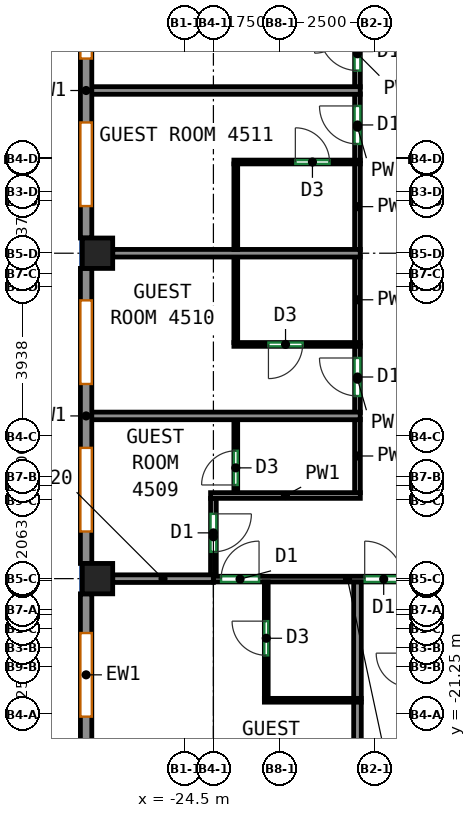
"""IFC4 building model, lengths in metres.
Left out: names, types, materials, properties, quantities, classifications, styles, units other than length and angle.
Written with IfcOpenShell. Run it as: python <this file> out.ifc"""

import sys

from ifc_helpers import new_model, si_unit, direction, frame, frame_2d, origin, origin_2d, place, context, subcontext, project, spatial, rectangle, extrude, source, transform, mapped, element, fill, save


model = new_model("IFC4")
c1 = context("Model", 3, precision=1e-05, world=origin(), true_north=direction((0.0, 1.0)))
c2 = subcontext(c1, "Body", "Model", "MODEL_VIEW")
j1 = project(units=[si_unit("LENGTHUNIT", "METRE"), si_unit("PLANEANGLEUNIT", "RADIAN")], contexts=[c1])
p1 = place(None, origin())
s1 = spatial("IfcSite", under=j1, at=p1, CompositionType="ELEMENT")
p2 = place(p1, origin())
s2 = spatial("IfcBuilding", under=s1, at=p2, CompositionType="ELEMENT")
p3 = place(p2, frame((0.0, 0.0, 188.9)))
s3 = spatial("IfcBuildingStorey", under=s2, at=p3, CompositionType="ELEMENT", Elevation=188.9)
m1 = source(origin(), c2, "Body", "SweptSolid", [
    extrude(rectangle(XDim=0.8, YDim=0.8, at=origin_2d()), origin(), (0.0, 0.0, 1.0), 3.12),
])
for number, where, z_axis, x_axis in (
    (1, (-26.8, -17.688, 0.0), (0.0, 0.0, 1.0), (1.0, 0.0, 0.0)),
    (2, (-26.8, -9.125, 0.0), (0.0, 0.0, 1.0), (1.0, 0.0, 0.0)),
):
    element("IfcColumn", number, at=place(p3, frame(where, z_axis=z_axis, x_axis=x_axis)), inside=s3, PredefinedType="COLUMN", context=c2, shape_type="MappedRepresentation", body=[
        mapped(m1, transform((0.0, 0.0, 0.0))),
    ])
m2 = source(origin(), c2, "Body", "SweptSolid", [
    extrude(rectangle(XDim=7.763, YDim=0.3, at=frame_2d((3.881, 0.0))), origin(), (0.0, 0.0, 1.0), 3.12),
])
p4 = place(p3, frame((-27.1, -0.962, 0.0), z_axis=(0.0, 0.0, 1.0), x_axis=(0.0, -1.0, 0.0)))
e3 = element("IfcWall", 3, at=p4, inside=s3, PredefinedType="SOLIDWALL", context=c2, shape_type="MappedRepresentation", body=[
    mapped(m2, transform((0.0, 0.0, 0.0))),
])
p5 = place(p4, frame((0.841, 0.0, 0.85)))
e4 = element("IfcOpeningElement", 4, at=p5, cuts=e3, PredefinedType="OPENING", context=c2, shape_type="SweptSolid", body=[
    extrude(rectangle(XDim=2.2, YDim=1.95, at=frame_2d((1.1, 0.975))), frame((0.0, 0.16, 0.0), z_axis=(0.0, -1.0, 0.0), x_axis=(1.0, 0.0, 0.0)), (0.0, 0.0, 1.0), 0.32),
])
p6 = place(p4, frame((4.722, 0.0, 0.85)))
e5 = element("IfcOpeningElement", 5, at=p6, cuts=e3, PredefinedType="OPENING", context=c2, shape_type="SweptSolid", body=[
    extrude(rectangle(XDim=2.2, YDim=1.95, at=frame_2d((1.1, 0.975))), frame((0.0, 0.16, 0.0), z_axis=(0.0, -1.0, 0.0), x_axis=(1.0, 0.0, 0.0)), (0.0, 0.0, 1.0), 0.32),
])
p7 = place(p3, frame((-27.1, -9.525, 0.0), z_axis=(0.0, 0.0, 1.0), x_axis=(0.0, -1.0, 0.0)))
e6 = element("IfcWall", 6, at=p7, inside=s3, PredefinedType="SOLIDWALL", context=c2, shape_type="MappedRepresentation", body=[
    mapped(m2, transform((0.0, 0.0, 0.0))),
])
p8 = place(p7, frame((0.841, 0.0, 0.85)))
e7 = element("IfcOpeningElement", 7, at=p8, cuts=e6, PredefinedType="OPENING", context=c2, shape_type="SweptSolid", body=[
    extrude(rectangle(XDim=2.2, YDim=1.95, at=frame_2d((1.1, 0.975))), frame((0.0, 0.16, 0.0), z_axis=(0.0, -1.0, 0.0), x_axis=(1.0, 0.0, 0.0)), (0.0, 0.0, 1.0), 0.32),
])
p9 = place(p7, frame((4.722, 0.0, 0.85)))
e8 = element("IfcOpeningElement", 8, at=p9, cuts=e6, PredefinedType="OPENING", context=c2, shape_type="SweptSolid", body=[
    extrude(rectangle(XDim=2.2, YDim=1.95, at=frame_2d((1.1, 0.975))), frame((0.0, 0.16, 0.0), z_axis=(0.0, -1.0, 0.0), x_axis=(1.0, 0.0, 0.0)), (0.0, 0.0, 1.0), 0.32),
])
m3 = source(origin(), c2, "Body", "SweptSolid", [
    extrude(rectangle(XDim=4.263, YDim=0.3, at=frame_2d((2.131, 0.0))), origin(), (0.0, 0.0, 1.0), 3.12),
])
p10 = place(p3, frame((-27.1, -18.087, 0.0), z_axis=(0.0, 0.0, 1.0), x_axis=(0.0, -1.0, 0.0)))
e9 = element("IfcWall", 9, at=p10, inside=s3, PredefinedType="SOLIDWALL", context=c2, shape_type="MappedRepresentation", body=[
    mapped(m3, transform((0.0, 0.0, 0.0))),
])
p11 = place(p10, frame((1.031, 0.0, 0.85)))
e10 = element("IfcOpeningElement", 10, at=p11, cuts=e9, PredefinedType="OPENING", context=c2, shape_type="SweptSolid", body=[
    extrude(rectangle(XDim=2.2, YDim=1.95, at=frame_2d((1.1, 0.975))), frame((0.0, 0.16, 0.0), z_axis=(0.0, -1.0, 0.0), x_axis=(1.0, 0.0, 0.0)), (0.0, 0.0, 1.0), 0.32),
])
p12 = place(p3, frame((-23.75, -17.7, 0.0), z_axis=(0.0, 0.0, 1.0), x_axis=(1.0, 0.0, 0.0)))
e11 = element("IfcWall", 11, at=p12, inside=s3, PredefinedType="PARTITIONING", context=c2, shape_type="SweptSolid", body=[
    extrude(rectangle(XDim=7.058, YDim=0.15, at=frame_2d((3.529, 0.0))), origin(), (0.0, 0.0, 1.0), 2.52),
])
p13 = place(p12, frame((0.201, 0.0, 0.0)))
e12 = element("IfcOpeningElement", 12, at=p13, cuts=e11, PredefinedType="OPENING", context=c2, shape_type="SweptSolid", body=[
    extrude(rectangle(XDim=1.0, YDim=2.1, at=frame_2d((0.5, 1.05))), frame((0.0, 0.085, 0.0), z_axis=(0.0, -1.0, 0.0), x_axis=(1.0, 0.0, 0.0)), (0.0, 0.0, 1.0), 0.17),
])
p14 = place(p12, frame((3.981, 0.0, 0.0)))
e13 = element("IfcOpeningElement", 13, at=p14, cuts=e11, PredefinedType="OPENING", context=c2, shape_type="SweptSolid", body=[
    extrude(rectangle(XDim=1.0, YDim=2.1, at=frame_2d((0.5, 1.05))), frame((0.0, 0.085, 0.0), z_axis=(0.0, -1.0, 0.0), x_axis=(1.0, 0.0, 0.0)), (0.0, 0.0, 1.0), 0.17),
])
p15 = place(p3, frame((-23.75, -15.575, 0.0), z_axis=(0.0, 0.0, 1.0), x_axis=(0.0, -1.0, 0.0)))
e14 = element("IfcWall", 14, at=p15, inside=s3, PredefinedType="PARTITIONING", context=c2, shape_type="SweptSolid", body=[
    extrude(rectangle(XDim=2.023, YDim=0.15, at=frame_2d((1.011, 0.0))), origin(), (0.0, 0.0, 1.0), 2.52),
])
p16 = place(p15, frame((0.408, 0.0, 0.0)))
e15 = element("IfcOpeningElement", 15, at=p16, cuts=e14, PredefinedType="OPENING", context=c2, shape_type="SweptSolid", body=[
    extrude(rectangle(XDim=1.0, YDim=2.1, at=frame_2d((0.5, 1.05))), frame((0.0, 0.085, 0.0), z_axis=(0.0, -1.0, 0.0), x_axis=(1.0, 0.0, 0.0)), (0.0, 0.0, 1.0), 0.17),
])
p17 = place(p3, frame((-23.825, -15.5, 0.0), z_axis=(0.0, 0.0, 1.0), x_axis=(1.0, 0.0, 0.0)))
e16 = element("IfcWall", 16, at=p17, inside=s3, PredefinedType="PARTITIONING", context=c2, shape_type="SweptSolid", body=[
    extrude(rectangle(XDim=3.941, YDim=0.15, at=frame_2d((1.97, 0.0))), origin(), (0.0, 0.0, 1.0), 3.12),
])
p18 = place(p3, frame((-19.959, -15.425, 0.0), z_axis=(0.0, 0.0, 1.0), x_axis=(0.0, 1.0, 0.0)))
e17 = element("IfcWall", 17, at=p18, inside=s3, PredefinedType="PARTITIONING", context=c2, shape_type="SweptSolid", body=[
    extrude(rectangle(XDim=1.929, YDim=0.15, at=frame_2d((0.964, 0.0))), origin(), (0.0, 0.0, 1.0), 3.12),
])
p19 = place(p3, frame((-19.959, -13.316, 0.0), z_axis=(0.0, 0.0, 1.0), x_axis=(0.0, 1.0, 0.0)))
e18 = element("IfcWall", 18, at=p19, inside=s3, PredefinedType="PARTITIONING", context=c2, shape_type="SweptSolid", body=[
    extrude(rectangle(XDim=1.751, YDim=0.15, at=frame_2d((0.875, 0.0))), origin(), (0.0, 0.0, 1.0), 3.12),
])
p20 = place(p19, frame((0.434, 0.0, 0.0)))
e19 = element("IfcOpeningElement", 19, at=p20, cuts=e18, PredefinedType="OPENING", context=c2, shape_type="SweptSolid", body=[
    extrude(rectangle(XDim=1.0, YDim=2.1, at=frame_2d((0.5, 1.05))), frame((0.0, 0.085, 0.0), z_axis=(0.0, -1.0, 0.0), x_axis=(1.0, 0.0, 0.0)), (0.0, 0.0, 1.0), 0.17),
])
p21 = place(p3, frame((-19.959, -11.485, 0.0), z_axis=(0.0, 0.0, 1.0), x_axis=(0.0, 1.0, 0.0)))
e20 = element("IfcWall", 20, at=p21, inside=s3, PredefinedType="PARTITIONING", context=c2, shape_type="SweptSolid", body=[
    extrude(rectangle(XDim=2.27, YDim=0.15, at=frame_2d((1.135, 0.0))), origin(), (0.0, 0.0, 1.0), 3.12),
])
p22 = place(p3, frame((-19.959, -6.685, 0.0), z_axis=(0.0, 0.0, 1.0), x_axis=(0.0, 1.0, 0.0)))
e21 = element("IfcWall", 21, at=p22, inside=s3, PredefinedType="PARTITIONING", context=c2, shape_type="SweptSolid", body=[
    extrude(rectangle(XDim=1.752, YDim=0.15, at=frame_2d((0.876, 0.0))), origin(), (0.0, 0.0, 1.0), 3.12),
])
p23 = place(p22, frame((0.435, 0.0, 0.0)))
e22 = element("IfcOpeningElement", 22, at=p23, cuts=e21, PredefinedType="OPENING", context=c2, shape_type="SweptSolid", body=[
    extrude(rectangle(XDim=1.0, YDim=2.1, at=frame_2d((0.5, 1.05))), frame((0.0, 0.085, 0.0), z_axis=(0.0, -1.0, 0.0), x_axis=(1.0, 0.0, 0.0)), (0.0, 0.0, 1.0), 0.17),
])
p24 = place(p3, frame((-19.959, -9.035, 0.0), z_axis=(0.0, 0.0, 1.0), x_axis=(0.0, 1.0, 0.0)))
e23 = element("IfcWall", 23, at=p24, inside=s3, PredefinedType="PARTITIONING", context=c2, shape_type="SweptSolid", body=[
    extrude(rectangle(XDim=2.27, YDim=0.15, at=frame_2d((1.135, 0.0))), origin(), (0.0, 0.0, 1.0), 3.12),
])
p25 = place(p3, frame((-19.959, -4.753, 0.0), z_axis=(0.0, 0.0, 1.0), x_axis=(0.0, 1.0, 0.0)))
e24 = element("IfcWall", 24, at=p25, inside=s3, PredefinedType="PARTITIONING", context=c2, shape_type="SweptSolid", body=[
    extrude(rectangle(XDim=1.751, YDim=0.15, at=frame_2d((0.875, 0.0))), origin(), (0.0, 0.0, 1.0), 3.12),
])
p26 = place(p25, frame((0.434, 0.0, 0.0)))
e25 = element("IfcOpeningElement", 25, at=p26, cuts=e24, PredefinedType="OPENING", context=c2, shape_type="SweptSolid", body=[
    extrude(rectangle(XDim=1.0, YDim=2.1, at=frame_2d((0.5, 1.05))), frame((0.0, 0.085, 0.0), z_axis=(0.0, -1.0, 0.0), x_axis=(1.0, 0.0, 0.0)), (0.0, 0.0, 1.0), 0.17),
])
p27 = place(p3, frame((-22.359, -20.838, 0.0), z_axis=(0.0, 0.0, 1.0), x_axis=(0.0, 1.0, 0.0)))
e26 = element("IfcWall", 26, at=p27, inside=s3, PredefinedType="PARTITIONING", context=c2, shape_type="SweptSolid", body=[
    extrude(rectangle(XDim=3.061, YDim=0.1, at=frame_2d((1.53, 0.0))), origin(), (0.0, 0.0, 1.0), 3.12),
])
p28 = place(p27, frame((1.132, 0.0, 0.0)))
e27 = element("IfcOpeningElement", 27, at=p28, cuts=e26, PredefinedType="OPENING", context=c2, shape_type="SweptSolid", body=[
    extrude(rectangle(XDim=0.9, YDim=2.1, at=frame_2d((0.45, 1.05))), frame((0.0, 0.06, 0.0), z_axis=(0.0, -1.0, 0.0), x_axis=(1.0, 0.0, 0.0)), (0.0, 0.0, 1.0), 0.12),
])
p29 = place(p3, frame((-22.409, -20.888, 0.0), z_axis=(0.0, 0.0, 1.0), x_axis=(1.0, 0.0, 0.0)))
e28 = element("IfcWall", 28, at=p29, inside=s3, PredefinedType="PARTITIONING", context=c2, shape_type="SweptSolid", body=[
    extrude(rectangle(XDim=2.55, YDim=0.1, at=frame_2d((1.275, 0.0))), origin(), (0.0, 0.0, 1.0), 3.12),
])
p30 = place(p3, frame((-19.959, -26.0, 0.0), z_axis=(0.0, 0.0, 1.0), x_axis=(0.0, 1.0, 0.0)))
e29 = element("IfcWall", 29, at=p30, inside=s3, PredefinedType="PARTITIONING", context=c2, shape_type="SweptSolid", body=[
    extrude(rectangle(XDim=5.062, YDim=0.2, at=frame_2d((2.531, 0.0))), origin(), (0.0, 0.0, 1.0), 3.12),
])
p31 = place(p3, frame((-26.4, -17.688, 0.0), z_axis=(0.0, 0.0, 1.0), x_axis=(1.0, 0.0, 0.0)))
e30 = element("IfcWall", 30, at=p31, inside=s3, PredefinedType="PARTITIONING", context=c2, shape_type="SweptSolid", body=[
    extrude(rectangle(XDim=2.648, YDim=0.2, at=frame_2d((1.324, 0.0))), origin(), (0.0, 0.0, 1.0), 2.52),
])
p32 = place(p3, frame((-19.959, -20.838, 0.0), z_axis=(0.0, 0.0, 1.0), x_axis=(0.0, 1.0, 0.0)))
e31 = element("IfcWall", 31, at=p32, inside=s3, PredefinedType="PARTITIONING", context=c2, shape_type="SweptSolid", body=[
    extrude(rectangle(XDim=3.061, YDim=0.2, at=frame_2d((1.53, 0.0))), origin(), (0.0, 0.0, 1.0), 3.12),
])
p33 = place(p3, frame((-23.161, -15.423, 0.0), z_axis=(0.0, 0.0, 1.0), x_axis=(0.0, 1.0, 0.0)))
e32 = element("IfcWall", 32, at=p33, inside=s3, PredefinedType="PARTITIONING", context=c2, shape_type="SweptSolid", body=[
    extrude(rectangle(XDim=1.917, YDim=0.1, at=frame_2d((0.958, 0.0))), origin(), (0.0, 0.0, 1.0), 3.12),
])
p34 = place(p33, frame((0.2, 0.0, 0.0)))
e33 = element("IfcOpeningElement", 33, at=p34, cuts=e32, PredefinedType="OPENING", context=c2, shape_type="SweptSolid", body=[
    extrude(rectangle(XDim=0.9, YDim=2.1, at=frame_2d((0.45, 1.05))), frame((0.0, 0.06, 0.0), z_axis=(0.0, -1.0, 0.0), x_axis=(1.0, 0.0, 0.0)), (0.0, 0.0, 1.0), 0.12),
])
p35 = place(p3, frame((-27.0, -13.406, 0.0), z_axis=(0.0, 0.0, 1.0), x_axis=(1.0, 0.0, 0.0)))
e34 = element("IfcWall", 34, at=p35, inside=s3, PredefinedType="PARTITIONING", context=c2, shape_type="SweptSolid", body=[
    extrude(rectangle(XDim=7.114, YDim=0.2, at=frame_2d((3.557, 0.0))), origin(), (0.0, 0.0, 1.0), 3.12),
])
p36 = place(p3, frame((-19.886, -11.525, 0.0), z_axis=(0.0, 0.0, 1.0), x_axis=(-1.0, 0.0, 0.0)))
e35 = element("IfcWall", 35, at=p36, inside=s3, PredefinedType="PARTITIONING", context=c2, shape_type="SweptSolid", body=[
    extrude(rectangle(XDim=3.325, YDim=0.1, at=frame_2d((1.663, 0.0))), origin(), (0.0, 0.0, 1.0), 3.12),
])
p37 = place(p36, frame((1.516, 0.0, 0.0)))
e36 = element("IfcOpeningElement", 36, at=p37, cuts=e35, PredefinedType="OPENING", context=c2, shape_type="SweptSolid", body=[
    extrude(rectangle(XDim=0.9, YDim=2.1, at=frame_2d((0.45, 1.05))), frame((0.0, 0.06, 0.0), z_axis=(0.0, -1.0, 0.0), x_axis=(1.0, 0.0, 0.0)), (0.0, 0.0, 1.0), 0.12),
])
p38 = place(p3, frame((-23.161, -11.475, 0.0), z_axis=(0.0, 0.0, 1.0), x_axis=(0.0, 1.0, 0.0)))
e37 = element("IfcWall", 37, at=p38, inside=s3, PredefinedType="PARTITIONING", context=c2, shape_type="SweptSolid", body=[
    extrude(rectangle(XDim=2.25, YDim=0.1, at=frame_2d((1.125, 0.0))), origin(), (0.0, 0.0, 1.0), 3.12),
])
p39 = place(p3, frame((-26.4, -9.125, 0.0), z_axis=(0.0, 0.0, 1.0), x_axis=(1.0, 0.0, 0.0)))
e38 = element("IfcWall", 38, at=p39, inside=s3, PredefinedType="PARTITIONING", context=c2, shape_type="SweptSolid", body=[
    extrude(rectangle(XDim=6.514, YDim=0.2, at=frame_2d((3.257, 0.0))), origin(), (0.0, 0.0, 1.0), 3.12),
])
p40 = place(p3, frame((-23.211, -6.725, 0.0), z_axis=(0.0, 0.0, 1.0), x_axis=(1.0, 0.0, 0.0)))
e39 = element("IfcWall", 39, at=p40, inside=s3, PredefinedType="PARTITIONING", context=c2, shape_type="SweptSolid", body=[
    extrude(rectangle(XDim=3.325, YDim=0.1, at=frame_2d((1.663, 0.0))), origin(), (0.0, 0.0, 1.0), 3.12),
])
p41 = place(p40, frame((1.617, 0.0, 0.0)))
e40 = element("IfcOpeningElement", 40, at=p41, cuts=e39, PredefinedType="OPENING", context=c2, shape_type="SweptSolid", body=[
    extrude(rectangle(XDim=0.9, YDim=2.1, at=frame_2d((0.45, 1.05))), frame((0.0, 0.06, 0.0), z_axis=(0.0, -1.0, 0.0), x_axis=(1.0, 0.0, 0.0)), (0.0, 0.0, 1.0), 0.12),
])
p42 = place(p3, frame((-23.161, -9.025, 0.0), z_axis=(0.0, 0.0, 1.0), x_axis=(0.0, 1.0, 0.0)))
e41 = element("IfcWall", 41, at=p42, inside=s3, PredefinedType="PARTITIONING", context=c2, shape_type="SweptSolid", body=[
    extrude(rectangle(XDim=2.25, YDim=0.1, at=frame_2d((1.125, 0.0))), origin(), (0.0, 0.0, 1.0), 3.12),
])
p43 = place(p3, frame((-27.0, -4.843, 0.0), z_axis=(0.0, 0.0, 1.0), x_axis=(1.0, 0.0, 0.0)))
e42 = element("IfcWall", 42, at=p43, inside=s3, PredefinedType="PARTITIONING", context=c2, shape_type="SweptSolid", body=[
    extrude(rectangle(XDim=7.114, YDim=0.2, at=frame_2d((3.557, 0.0))), origin(), (0.0, 0.0, 1.0), 3.12),
])
p44 = place(p5, origin())
e43 = element("IfcWindow", 43, at=p44, inside=s3, PartitioningType="SINGLE_PANEL", PredefinedType="WINDOW", context=c2, shape_type="SweptSolid", body=[
    extrude(rectangle(XDim=2.2, YDim=1.95, at=frame_2d((1.1, 0.975))), frame((0.0, 0.03, 0.0), z_axis=(0.0, -1.0, 0.0), x_axis=(1.0, 0.0, 0.0)), (0.0, 0.0, 1.0), 0.06),
])
fill(e4, e43)
p45 = place(p6, origin())
e44 = element("IfcWindow", 44, at=p45, inside=s3, PartitioningType="SINGLE_PANEL", PredefinedType="WINDOW", context=c2, shape_type="SweptSolid", body=[
    extrude(rectangle(XDim=2.2, YDim=1.95, at=frame_2d((1.1, 0.975))), frame((0.0, 0.03, 0.0), z_axis=(0.0, -1.0, 0.0), x_axis=(1.0, 0.0, 0.0)), (0.0, 0.0, 1.0), 0.06),
])
fill(e5, e44)
p46 = place(p8, origin())
e45 = element("IfcWindow", 45, at=p46, inside=s3, PartitioningType="SINGLE_PANEL", PredefinedType="WINDOW", context=c2, shape_type="SweptSolid", body=[
    extrude(rectangle(XDim=2.2, YDim=1.95, at=frame_2d((1.1, 0.975))), frame((0.0, 0.03, 0.0), z_axis=(0.0, -1.0, 0.0), x_axis=(1.0, 0.0, 0.0)), (0.0, 0.0, 1.0), 0.06),
])
fill(e7, e45)
p47 = place(p9, origin())
e46 = element("IfcWindow", 46, at=p47, inside=s3, PartitioningType="SINGLE_PANEL", PredefinedType="WINDOW", context=c2, shape_type="SweptSolid", body=[
    extrude(rectangle(XDim=2.2, YDim=1.95, at=frame_2d((1.1, 0.975))), frame((0.0, 0.03, 0.0), z_axis=(0.0, -1.0, 0.0), x_axis=(1.0, 0.0, 0.0)), (0.0, 0.0, 1.0), 0.06),
])
fill(e8, e46)
p48 = place(p11, origin())
e47 = element("IfcWindow", 47, at=p48, inside=s3, PartitioningType="SINGLE_PANEL", PredefinedType="WINDOW", context=c2, shape_type="SweptSolid", body=[
    extrude(rectangle(XDim=2.2, YDim=1.95, at=frame_2d((1.1, 0.975))), frame((0.0, 0.03, 0.0), z_axis=(0.0, -1.0, 0.0), x_axis=(1.0, 0.0, 0.0)), (0.0, 0.0, 1.0), 0.06),
])
fill(e10, e47)
p49 = place(p28, origin())
e48 = element("IfcDoor", 48, at=p49, inside=s3, OperationType="SINGLE_SWING_RIGHT", PredefinedType="DOOR", context=c2, shape_type="SweptSolid", body=[
    extrude(rectangle(XDim=0.9, YDim=2.1, at=frame_2d((0.45, 1.05))), frame((0.0, 0.025, 0.0), z_axis=(0.0, -1.0, 0.0), x_axis=(1.0, 0.0, 0.0)), (0.0, 0.0, 1.0), 0.05),
])
fill(e27, e48)
p50 = place(p13, origin())
e49 = element("IfcDoor", 49, at=p50, inside=s3, OperationType="SINGLE_SWING_RIGHT", PredefinedType="DOOR", context=c2, shape_type="SweptSolid", body=[
    extrude(rectangle(XDim=1.0, YDim=2.1, at=frame_2d((0.5, 1.05))), frame((0.0, 0.025, 0.0), z_axis=(0.0, -1.0, 0.0), x_axis=(1.0, 0.0, 0.0)), (0.0, 0.0, 1.0), 0.05),
])
fill(e12, e49)
p51 = place(p14, origin())
e50 = element("IfcDoor", 50, at=p51, inside=s3, OperationType="SINGLE_SWING_LEFT", PredefinedType="DOOR", context=c2, shape_type="SweptSolid", body=[
    extrude(rectangle(XDim=1.0, YDim=2.1, at=frame_2d((0.5, 1.05))), frame((0.0, 0.025, 0.0), z_axis=(0.0, -1.0, 0.0), x_axis=(1.0, 0.0, 0.0)), (0.0, 0.0, 1.0), 0.05),
])
fill(e13, e50)
p52 = place(p16, origin())
e51 = element("IfcDoor", 51, at=p52, inside=s3, OperationType="SINGLE_SWING_LEFT", PredefinedType="DOOR", context=c2, shape_type="SweptSolid", body=[
    extrude(rectangle(XDim=1.0, YDim=2.1, at=frame_2d((0.5, 1.05))), frame((0.0, 0.025, 0.0), z_axis=(0.0, -1.0, 0.0), x_axis=(1.0, 0.0, 0.0)), (0.0, 0.0, 1.0), 0.05),
])
fill(e15, e51)
p53 = place(p34, origin())
e52 = element("IfcDoor", 52, at=p53, inside=s3, OperationType="SINGLE_SWING_LEFT", PredefinedType="DOOR", context=c2, shape_type="SweptSolid", body=[
    extrude(rectangle(XDim=0.9, YDim=2.1, at=frame_2d((0.45, 1.05))), frame((0.0, 0.025, 0.0), z_axis=(0.0, -1.0, 0.0), x_axis=(1.0, 0.0, 0.0)), (0.0, 0.0, 1.0), 0.05),
])
fill(e33, e52)
p54 = place(p20, origin())
e53 = element("IfcDoor", 53, at=p54, inside=s3, OperationType="SINGLE_SWING_RIGHT", PredefinedType="DOOR", context=c2, shape_type="SweptSolid", body=[
    extrude(rectangle(XDim=1.0, YDim=2.1, at=frame_2d((0.5, 1.05))), frame((0.0, 0.025, 0.0), z_axis=(0.0, -1.0, 0.0), x_axis=(1.0, 0.0, 0.0)), (0.0, 0.0, 1.0), 0.05),
])
fill(e19, e53)
p55 = place(p37, origin())
e54 = element("IfcDoor", 54, at=p55, inside=s3, OperationType="SINGLE_SWING_RIGHT", PredefinedType="DOOR", context=c2, shape_type="SweptSolid", body=[
    extrude(rectangle(XDim=0.9, YDim=2.1, at=frame_2d((0.45, 1.05))), frame((0.0, 0.025, 0.0), z_axis=(0.0, -1.0, 0.0), x_axis=(1.0, 0.0, 0.0)), (0.0, 0.0, 1.0), 0.05),
])
fill(e36, e54)
p56 = place(p41, origin())
e55 = element("IfcDoor", 55, at=p56, inside=s3, OperationType="SINGLE_SWING_LEFT", PredefinedType="DOOR", context=c2, shape_type="SweptSolid", body=[
    extrude(rectangle(XDim=0.9, YDim=2.1, at=frame_2d((0.45, 1.05))), frame((0.0, 0.025, 0.0), z_axis=(0.0, -1.0, 0.0), x_axis=(1.0, 0.0, 0.0)), (0.0, 0.0, 1.0), 0.05),
])
fill(e40, e55)
p57 = place(p23, origin())
e56 = element("IfcDoor", 56, at=p57, inside=s3, OperationType="SINGLE_SWING_RIGHT", PredefinedType="DOOR", context=c2, shape_type="SweptSolid", body=[
    extrude(rectangle(XDim=1.0, YDim=2.1, at=frame_2d((0.5, 1.05))), frame((0.0, 0.025, 0.0), z_axis=(0.0, -1.0, 0.0), x_axis=(1.0, 0.0, 0.0)), (0.0, 0.0, 1.0), 0.05),
])
fill(e22, e56)
p58 = place(p26, origin())
e57 = element("IfcDoor", 57, at=p58, inside=s3, OperationType="SINGLE_SWING_RIGHT", PredefinedType="DOOR", context=c2, shape_type="SweptSolid", body=[
    extrude(rectangle(XDim=1.0, YDim=2.1, at=frame_2d((0.5, 1.05))), frame((0.0, 0.025, 0.0), z_axis=(0.0, -1.0, 0.0), x_axis=(1.0, 0.0, 0.0)), (0.0, 0.0, 1.0), 0.05),
])
fill(e25, e57)
save(model, sys.argv[1])
